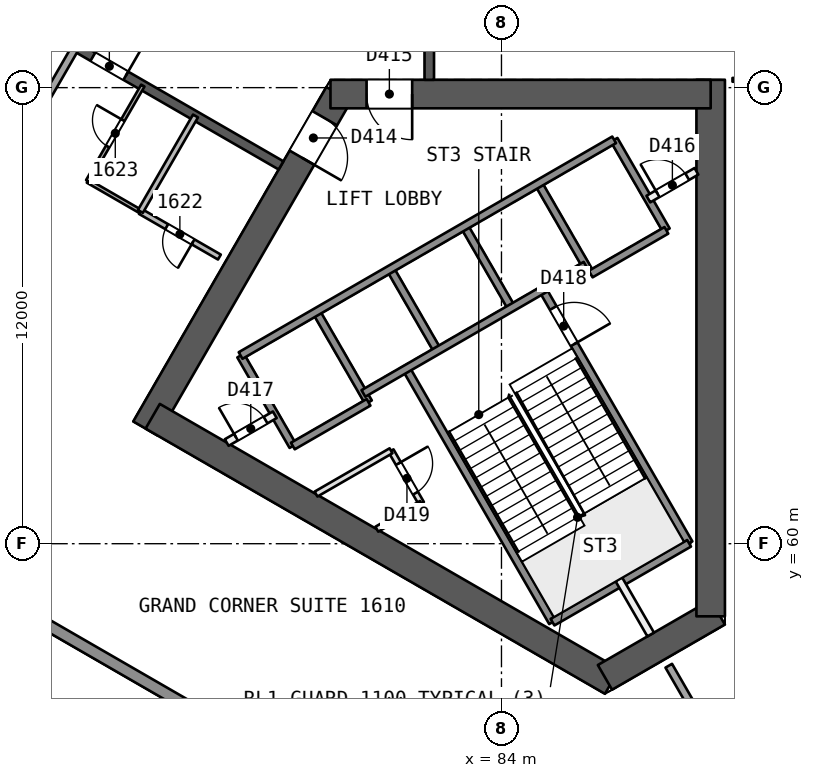
"""IFC4 building model, lengths in metres.
Left out: names, types, materials, properties, quantities, classifications, styles, units other than length and angle.
Written with IfcOpenShell. Run it as: python <this file> out.ifc"""

import sys

from ifc_helpers import new_model, si_unit, direction, frame, frame_2d, origin, place, context, subcontext, project, spatial, rectangle, extrude, element, fill, save


model = new_model("IFC4")
c1 = context("Model", 3, precision=1e-05, world=origin(), true_north=direction((0.0, 1.0)))
c2 = subcontext(c1, "Body", "Model", "MODEL_VIEW")
j1 = project(units=[si_unit("LENGTHUNIT", "METRE"), si_unit("PLANEANGLEUNIT", "RADIAN")], contexts=[c1])
p1 = place(None, origin())
s1 = spatial("IfcSite", under=j1, at=p1, CompositionType="ELEMENT")
p2 = place(p1, origin())
s2 = spatial("IfcBuilding", under=s1, at=p2, CompositionType="ELEMENT")
p3 = place(p2, frame((0.0, 0.0, 72.1)))
s3 = spatial("IfcBuildingStorey", under=s2, at=p3, CompositionType="ELEMENT", Elevation=72.1)
p4 = place(p3, frame((79.717, 71.831, 0.0), z_axis=(0.0, 0.0, 1.0), x_axis=(-0.499996230114, -0.866027580318, 0.0)))
e1 = element("IfcWall", 1, at=p4, inside=s3, PredefinedType="SHEAR", context=c2, shape_type="SweptSolid", body=[
    extrude(rectangle(XDim=10.164, YDim=0.75, at=frame_2d((5.082, 0.0))), origin(), (0.0, 0.0, 1.0), 3.7),
])
p5 = place(p4, frame((0.733, 0.0, 0.0)))
e2 = element("IfcOpeningElement", 2, at=p5, cuts=e1, PredefinedType="OPENING", context=c2, shape_type="SweptSolid", body=[
    extrude(rectangle(XDim=1.2, YDim=2.1, at=frame_2d((0.6, 1.05))), frame((0.0, 0.385, 0.0), z_axis=(0.0, -1.0, 0.0), x_axis=(1.0, 0.0, 0.0)), (0.0, 0.0, 1.0), 0.771),
])
p6 = place(p3, frame((74.822, 63.354, 0.0), z_axis=(0.0, 0.0, 1.0), x_axis=(0.8660248072, -0.500001033313, 0.0)))
e3 = element("IfcWall", 3, at=p6, inside=s3, PredefinedType="SHEAR", context=c2, shape_type="SweptSolid", body=[
    extrude(rectangle(XDim=13.958, YDim=0.75, at=frame_2d((6.979, 0.0))), origin(), (0.0, 0.0, 1.0), 3.7),
])
p7 = place(p3, frame((86.723, 56.483, 0.0), z_axis=(0.0, 0.0, 1.0), x_axis=(0.866017201164, 0.500014207086, 0.0)))
e4 = element("IfcWall", 4, at=p7, inside=s3, PredefinedType="SHEAR", context=c2, shape_type="SweptSolid", body=[
    extrude(rectangle(XDim=3.429, YDim=0.75, at=frame_2d((1.714, 0.0))), origin(), (0.0, 0.0, 1.0), 3.7),
])
p8 = place(p3, frame((89.505, 58.089, 0.0), z_axis=(0.0, 0.0, 1.0), x_axis=(0.0, 1.0, 0.0)))
e5 = element("IfcWall", 5, at=p8, inside=s3, PredefinedType="SHEAR", context=c2, shape_type="SweptSolid", body=[
    extrude(rectangle(XDim=14.117, YDim=0.75, at=frame_2d((7.059, 0.0))), origin(), (0.0, 0.0, 1.0), 3.7),
])
p9 = place(p3, frame((89.505, 71.831, 0.0), z_axis=(0.0, 0.0, 1.0), x_axis=(-1.0, 0.0, 0.0)))
e6 = element("IfcWall", 6, at=p9, inside=s3, PredefinedType="SHEAR", context=c2, shape_type="SweptSolid", body=[
    extrude(rectangle(XDim=10.005, YDim=0.75, at=frame_2d((5.002, 0.0))), origin(), (0.0, 0.0, 1.0), 3.7),
])
p10 = place(p9, frame((7.855, 0.0, 0.0)))
e7 = element("IfcOpeningElement", 7, at=p10, cuts=e6, PredefinedType="OPENING", context=c2, shape_type="SweptSolid", body=[
    extrude(rectangle(XDim=1.2, YDim=2.1, at=frame_2d((0.6, 1.05))), frame((0.0, 0.385, 0.0), z_axis=(0.0, -1.0, 0.0), x_axis=(1.0, 0.0, 0.0)), (0.0, 0.0, 1.0), 0.771),
])
p11 = place(p3, frame((82.1, 72.206, 0.0), z_axis=(0.0, 0.0, 1.0), x_axis=(0.0, 1.0, 0.0)))
e8 = element("IfcWall", 8, at=p11, inside=s3, PredefinedType="SHEAR", context=c2, shape_type="SweptSolid", body=[
    extrude(rectangle(XDim=15.588, YDim=0.25, at=frame_2d((7.794, 0.0))), origin(), (0.0, 0.0, 1.0), 3.2),
])
p12 = place(p11, frame((2.462, 0.0, 0.0)))
e9 = element("IfcOpeningElement", 9, at=p12, cuts=e8, PredefinedType="OPENING", context=c2, shape_type="SweptSolid", body=[
    extrude(rectangle(XDim=1.0, YDim=2.1, at=frame_2d((0.5, 1.05))), frame((0.0, 0.135, 0.0), z_axis=(0.0, -1.0, 0.0), x_axis=(1.0, 0.0, 0.0)), (0.0, 0.0, 1.0), 0.271),
])
p13 = place(p11, frame((6.799, 0.0, 0.0)))
e10 = element("IfcOpeningElement", 10, at=p13, cuts=e8, PredefinedType="OPENING", context=c2, shape_type="SweptSolid", body=[
    extrude(rectangle(XDim=0.9, YDim=2.1, at=frame_2d((0.45, 1.05))), frame((0.0, 0.135, 0.0), z_axis=(0.0, -1.0, 0.0), x_axis=(1.0, 0.0, 0.0)), (0.0, 0.0, 1.0), 0.271),
])
p14 = place(p11, frame((9.449, 0.0, 0.0)))
e11 = element("IfcOpeningElement", 11, at=p14, cuts=e8, PredefinedType="OPENING", context=c2, shape_type="SweptSolid", body=[
    extrude(rectangle(XDim=0.9, YDim=2.1, at=frame_2d((0.45, 1.05))), frame((0.0, 0.135, 0.0), z_axis=(0.0, -1.0, 0.0), x_axis=(1.0, 0.0, 0.0)), (0.0, 0.0, 1.0), 0.271),
])
p15 = place(p11, frame((12.906, 0.0, 0.0)))
e12 = element("IfcOpeningElement", 12, at=p15, cuts=e8, PredefinedType="OPENING", context=c2, shape_type="SweptSolid", body=[
    extrude(rectangle(XDim=1.0, YDim=2.1, at=frame_2d((0.5, 1.05))), frame((0.0, 0.135, 0.0), z_axis=(0.0, -1.0, 0.0), x_axis=(1.0, 0.0, 0.0)), (0.0, 0.0, 1.0), 0.271),
])
p16 = place(p3, frame((64.7, 77.748, 0.0), z_axis=(0.0, 0.0, 1.0), x_axis=(0.866026492143, -0.499998114903, 0.0)))
e13 = element("IfcWall", 13, at=p16, inside=s3, PredefinedType="SHEAR", context=c2, shape_type="SweptSolid", body=[
    extrude(rectangle(XDim=15.588, YDim=0.25, at=frame_2d((7.794, 0.0))), origin(), (0.0, 0.0, 1.0), 3.2),
])
p17 = place(p16, frame((2.306, 0.0, 0.0)))
e14 = element("IfcOpeningElement", 14, at=p17, cuts=e13, PredefinedType="OPENING", context=c2, shape_type="SweptSolid", body=[
    extrude(rectangle(XDim=1.0, YDim=2.1, at=frame_2d((0.5, 1.05))), frame((0.0, 0.135, 0.0), z_axis=(0.0, -1.0, 0.0), x_axis=(1.0, 0.0, 0.0)), (0.0, 0.0, 1.0), 0.271),
])
p18 = place(p16, frame((8.003, 0.0, 0.0)))
e15 = element("IfcOpeningElement", 15, at=p18, cuts=e13, PredefinedType="OPENING", context=c2, shape_type="SweptSolid", body=[
    extrude(rectangle(XDim=1.1, YDim=2.1, at=frame_2d((0.55, 1.05))), frame((0.0, 0.135, 0.0), z_axis=(0.0, -1.0, 0.0), x_axis=(1.0, 0.0, 0.0)), (0.0, 0.0, 1.0), 0.271),
])
p19 = place(p16, frame((9.871, 0.0, 0.0)))
e16 = element("IfcOpeningElement", 16, at=p19, cuts=e13, PredefinedType="OPENING", context=c2, shape_type="SweptSolid", body=[
    extrude(rectangle(XDim=1.0, YDim=2.1, at=frame_2d((0.5, 1.05))), frame((0.0, 0.135, 0.0), z_axis=(0.0, -1.0, 0.0), x_axis=(1.0, 0.0, 0.0)), (0.0, 0.0, 1.0), 0.271),
])
p20 = place(p3, frame((90.079, 72.206, 0.0), z_axis=(0.0, 0.0, 1.0), x_axis=(1.0, 0.0, 0.0)))
e17 = element("IfcWall", 17, at=p20, inside=s3, PredefinedType="PARTITIONING", context=c2, shape_type="SweptSolid", body=[
    extrude(rectangle(XDim=5.422, YDim=0.1, at=frame_2d((2.711, 0.0))), origin(), (0.0, 0.0, 1.0), 3.2),
])
p21 = place(p20, frame((2.261, 0.0, 0.0)))
e18 = element("IfcOpeningElement", 18, at=p21, cuts=e17, PredefinedType="OPENING", context=c2, shape_type="SweptSolid", body=[
    extrude(rectangle(XDim=0.9, YDim=2.1, at=frame_2d((0.45, 1.05))), frame((0.0, 0.061, 0.0), z_axis=(0.0, -1.0, 0.0), x_axis=(1.0, 0.0, 0.0)), (0.0, 0.0, 1.0), 0.121),
])
p22 = place(p3, frame((88.402, 56.789, 0.0), z_axis=(0.0, 0.0, 1.0), x_axis=(0.500005415952, -0.866022276861, 0.0)))
e19 = element("IfcWall", 19, at=p22, inside=s3, PredefinedType="PARTITIONING", context=c2, shape_type="SweptSolid", body=[
    extrude(rectangle(XDim=9.087, YDim=0.2, at=frame_2d((4.543, 0.0))), origin(), (0.0, 0.0, 1.0), 3.2),
])
p23 = place(p3, frame((66.099, 61.466, 0.0), z_axis=(0.0, 0.0, 1.0), x_axis=(0.500006835139, 0.866021457479, 0.0)))
e20 = element("IfcWall", 20, at=p23, inside=s3, PredefinedType="PARTITIONING", context=c2, shape_type="SweptSolid", body=[
    extrude(rectangle(XDim=13.401, YDim=0.2, at=frame_2d((6.701, 0.0))), origin(), (0.0, 0.0, 1.0), 3.2),
])
p24 = place(p3, frame((76.578, 67.542, 0.0), z_axis=(0.0, 0.0, 1.0), x_axis=(-0.866038271014, 0.499977712642, 0.0)))
e21 = element("IfcWall", 21, at=p24, inside=s3, PredefinedType="PARTITIONING", context=c2, shape_type="SweptSolid", body=[
    extrude(rectangle(XDim=2.401, YDim=0.15, at=frame_2d((1.2, 0.0))), origin(), (0.0, 0.0, 1.0), 3.2),
])
p25 = place(p24, frame((0.801, 0.0, 0.0)))
e22 = element("IfcOpeningElement", 22, at=p25, cuts=e21, PredefinedType="OPENING", context=c2, shape_type="SweptSolid", body=[
    extrude(rectangle(XDim=0.8, YDim=2.1, at=frame_2d((0.4, 1.05))), frame((0.0, 0.085, 0.0), z_axis=(0.0, -1.0, 0.0), x_axis=(1.0, 0.0, 0.0)), (0.0, 0.0, 1.0), 0.171),
])
p26 = place(p3, frame((74.498, 68.743, 0.0), z_axis=(0.0, 0.0, 1.0), x_axis=(-0.865989903783, 0.500061482766, 0.0)))
e23 = element("IfcWall", 23, at=p26, inside=s3, PredefinedType="PARTITIONING", context=c2, shape_type="SweptSolid", body=[
    extrude(rectangle(XDim=1.6, YDim=0.1, at=frame_2d((0.8, 0.0))), origin(), (0.0, 0.0, 1.0), 3.2),
])
p27 = place(p3, frame((73.113, 69.543, 0.0), z_axis=(0.0, 0.0, 1.0), x_axis=(0.499987231761, 0.866032775405, 0.0)))
e24 = element("IfcWall", 24, at=p27, inside=s3, PredefinedType="PARTITIONING", context=c2, shape_type="SweptSolid", body=[
    extrude(rectangle(XDim=2.9, YDim=0.1, at=frame_2d((1.45, 0.0))), origin(), (0.0, 0.0, 1.0), 3.2),
])
p28 = place(p27, frame((1.05, 0.0, 0.0)))
e25 = element("IfcOpeningElement", 25, at=p28, cuts=e24, PredefinedType="OPENING", context=c2, shape_type="SweptSolid", body=[
    extrude(rectangle(XDim=0.8, YDim=2.1, at=frame_2d((0.4, 1.05))), frame((0.0, 0.061, 0.0), z_axis=(0.0, -1.0, 0.0), x_axis=(1.0, 0.0, 0.0)), (0.0, 0.0, 1.0), 0.121),
])
p29 = place(p3, frame((75.948, 71.254, 0.0), z_axis=(0.0, 0.0, 1.0), x_axis=(-0.499987231761, -0.866032775405, 0.0)))
e26 = element("IfcWall", 26, at=p29, inside=s3, PredefinedType="PARTITIONING", context=c2, shape_type="SweptSolid", body=[
    extrude(rectangle(XDim=2.9, YDim=0.15, at=frame_2d((1.45, 0.0))), origin(), (0.0, 0.0, 1.0), 3.2),
])
p30 = place(p3, frame((90.388, 47.271, 0.0), z_axis=(0.0, 0.0, 1.0), x_axis=(-0.866024483997, 0.500001593116, 0.0)))
e27 = element("IfcWall", 27, at=p30, inside=s3, PredefinedType="SOLIDWALL", context=c2, shape_type="SweptSolid", body=[
    extrude(rectangle(XDim=59.381, YDim=0.3, at=frame_2d((29.69, 0.0))), origin(), (0.0, 0.0, 1.0), 3.2),
])
p31 = place(p30, frame((28.802, 0.0, 0.0)))
e28 = element("IfcOpeningElement", 28, at=p31, cuts=e27, PredefinedType="OPENING", context=c2, shape_type="SweptSolid", body=[
    extrude(rectangle(XDim=2.4, YDim=2.4, at=frame_2d((1.2, 1.2))), frame((0.0, 0.161, 0.0), z_axis=(0.0, -1.0, 0.0), x_axis=(1.0, 0.0, 0.0)), (0.0, 0.0, 1.0), 0.321),
])
p32 = place(p30, frame((33.479, 0.0, 0.0)))
e29 = element("IfcOpeningElement", 29, at=p32, cuts=e27, PredefinedType="OPENING", context=c2, shape_type="SweptSolid", body=[
    extrude(rectangle(XDim=2.4, YDim=2.4, at=frame_2d((1.2, 1.2))), frame((0.0, 0.161, 0.0), z_axis=(0.0, -1.0, 0.0), x_axis=(1.0, 0.0, 0.0)), (0.0, 0.0, 1.0), 0.321),
])
p33 = place(p30, frame((46.066, 0.0, 0.0)))
e30 = element("IfcOpeningElement", 30, at=p33, cuts=e27, PredefinedType="OPENING", context=c2, shape_type="SweptSolid", body=[
    extrude(rectangle(XDim=2.4, YDim=2.4, at=frame_2d((1.2, 1.2))), frame((0.0, 0.161, 0.0), z_axis=(0.0, -1.0, 0.0), x_axis=(1.0, 0.0, 0.0)), (0.0, 0.0, 1.0), 0.321),
])
p34 = place(p30, frame((12.823, 0.0, 0.0)))
e31 = element("IfcOpeningElement", 31, at=p34, cuts=e27, PredefinedType="OPENING", context=c2, shape_type="SweptSolid", body=[
    extrude(rectangle(XDim=2.4, YDim=2.4, at=frame_2d((1.2, 1.2))), frame((0.0, 0.161, 0.0), z_axis=(0.0, -1.0, 0.0), x_axis=(1.0, 0.0, 0.0)), (0.0, 0.0, 1.0), 0.321),
])
p35 = place(p3, frame((77.135, 64.952, 0.0), z_axis=(0.0, 0.0, 1.0), x_axis=(0.499996545922, -0.866027397988, 0.0)))
e32 = element("IfcWall", 32, at=p35, inside=s3, PredefinedType="SOLIDWALL", context=c2, shape_type="SweptSolid", body=[
    extrude(rectangle(XDim=2.75, YDim=0.2, at=frame_2d((1.375, 0.0))), origin(), (0.0, 0.0, 1.0), 3.2),
])
p36 = place(p3, frame((81.094, 62.445, 0.0), z_axis=(0.0, 0.0, 1.0), x_axis=(0.499880961361, -0.866094119867, 0.0)))
e33 = element("IfcWall", 33, at=p36, inside=s3, PredefinedType="PARTITIONING", context=c2, shape_type="SweptSolid", body=[
    extrude(rectangle(XDim=1.6, YDim=0.15, at=frame_2d((0.8, 0.0))), origin(), (0.0, 0.0, 1.0), 3.2),
])
p37 = place(p36, frame((0.387, 0.0, 0.0)))
e34 = element("IfcOpeningElement", 34, at=p37, cuts=e33, PredefinedType="OPENING", context=c2, shape_type="SweptSolid", body=[
    extrude(rectangle(XDim=0.9, YDim=2.1, at=frame_2d((0.45, 1.05))), frame((0.0, 0.085, 0.0), z_axis=(0.0, -1.0, 0.0), x_axis=(1.0, 0.0, 0.0)), (0.0, 0.0, 1.0), 0.171),
])
p38 = place(p3, frame((79.127, 66.102, 0.0), z_axis=(0.0, 0.0, 1.0), x_axis=(0.499996545922, -0.866027397988, 0.0)))
e35 = element("IfcWall", 35, at=p38, inside=s3, PredefinedType="SOLIDWALL", context=c2, shape_type="SweptSolid", body=[
    extrude(rectangle(XDim=2.75, YDim=0.2, at=frame_2d((1.375, 0.0))), origin(), (0.0, 0.0, 1.0), 3.2),
])
p39 = place(p3, frame((81.493, 64.604, 0.0), z_axis=(0.0, 0.0, 1.0), x_axis=(0.500006057782, -0.866021906294, 0.0)))
e36 = element("IfcWall", 36, at=p39, inside=s3, PredefinedType="SOLIDWALL", context=c2, shape_type="SweptSolid", body=[
    extrude(rectangle(XDim=7.7, YDim=0.2, at=frame_2d((3.85, 0.0))), origin(), (0.0, 0.0, 1.0), 3.2),
])
p40 = place(p3, frame((81.076, 67.227, 0.0), z_axis=(0.0, 0.0, 1.0), x_axis=(0.50000366821, -0.866023285932, 0.0)))
e37 = element("IfcWall", 37, at=p40, inside=s3, PredefinedType="SOLIDWALL", context=c2, shape_type="SweptSolid", body=[
    extrude(rectangle(XDim=2.48, YDim=0.2, at=frame_2d((1.24, 0.0))), origin(), (0.0, 0.0, 1.0), 3.2),
])
p41 = place(p3, frame((87.09, 59.06, 0.0), z_axis=(0.0, 0.0, 1.0), x_axis=(0.499937194881, -0.866061661301, 0.0)))
e38 = element("IfcWall", 38, at=p41, inside=s3, PredefinedType="PARTITIONING", context=c2, shape_type="SweptSolid", body=[
    extrude(rectangle(XDim=1.673, YDim=0.2, at=frame_2d((0.836, 0.0))), origin(), (0.0, 0.0, 1.0), 3.2),
])
p42 = place(p3, frame((83.024, 68.352, 0.0), z_axis=(0.0, 0.0, 1.0), x_axis=(0.50000366821, -0.866023285932, 0.0)))
e39 = element("IfcWall", 39, at=p42, inside=s3, PredefinedType="SOLIDWALL", context=c2, shape_type="SweptSolid", body=[
    extrude(rectangle(XDim=2.48, YDim=0.2, at=frame_2d((1.24, 0.0))), origin(), (0.0, 0.0, 1.0), 3.2),
])
p43 = place(p3, frame((85.087, 66.679, 0.0), z_axis=(0.0, 0.0, 1.0), x_axis=(0.500019787375, -0.866013979237, 0.0)))
e40 = element("IfcWall", 40, at=p43, inside=s3, PredefinedType="SOLIDWALL", context=c2, shape_type="SweptSolid", body=[
    extrude(rectangle(XDim=7.7, YDim=0.2, at=frame_2d((3.85, 0.0))), origin(), (0.0, 0.0, 1.0), 3.2),
])
p44 = place(p43, frame((0.55, 0.0, 0.0)))
e41 = element("IfcOpeningElement", 41, at=p44, cuts=e40, PredefinedType="OPENING", context=c2, shape_type="SweptSolid", body=[
    extrude(rectangle(XDim=1.1, YDim=2.1, at=frame_2d((0.55, 1.05))), frame((0.0, 0.11, 0.0), z_axis=(0.0, -1.0, 0.0), x_axis=(1.0, 0.0, 0.0)), (0.0, 0.0, 1.0), 0.221),
])
for number, where, z_axis, x_axis in (
    (42, (84.973, 69.477, 0.0), (0.0, 0.0, 1.0), (0.5, -0.866, 0.0)),
    (43, (86.965, 70.626, 0.0), (0.0, 0.0, 1.0), (0.5, -0.866, 0.0)),
):
    element("IfcWall", number, at=place(p3, frame(where, z_axis=z_axis, x_axis=x_axis)), inside=s3, PredefinedType="SOLIDWALL", context=c2, shape_type="SweptSolid", body=[
        extrude(rectangle(XDim=2.75, YDim=0.2, at=frame_2d((1.375, 0.0))), origin(), (0.0, 0.0, 1.0), 3.2),
    ])
p45 = place(p3, frame((77.135, 64.952, 0.0), z_axis=(0.0, 0.0, 1.0), x_axis=(0.866031916153, 0.499988720078, 0.0)))
e44 = element("IfcWall", 44, at=p45, inside=s3, PredefinedType="SOLIDWALL", context=c2, shape_type="SweptSolid", body=[
    extrude(rectangle(XDim=11.35, YDim=0.2, at=frame_2d((5.675, 0.0))), origin(), (0.0, 0.0, 1.0), 3.2),
])
p46 = place(p3, frame((76.77, 62.662, 0.0), z_axis=(0.0, 0.0, 1.0), x_axis=(0.866054810376, 0.49994906283, 0.0)))
e45 = element("IfcWall", 45, at=p46, inside=s3, PredefinedType="PARTITIONING", context=c2, shape_type="SweptSolid", body=[
    extrude(rectangle(XDim=1.461, YDim=0.2, at=frame_2d((0.73, 0.0))), origin(), (0.0, 0.0, 1.0), 3.2),
])
p47 = place(p46, frame((0.281, 0.0, 0.0)))
e46 = element("IfcOpeningElement", 46, at=p47, cuts=e45, PredefinedType="OPENING", context=c2, shape_type="SweptSolid", body=[
    extrude(rectangle(XDim=0.9, YDim=2.1, at=frame_2d((0.45, 1.05))), frame((0.0, 0.11, 0.0), z_axis=(0.0, -1.0, 0.0), x_axis=(1.0, 0.0, 0.0)), (0.0, 0.0, 1.0), 0.221),
])
p48 = place(p3, frame((87.865, 69.068, 0.0), z_axis=(0.0, 0.0, 1.0), x_axis=(0.865982457891, 0.500074377092, 0.0)))
e47 = element("IfcWall", 47, at=p48, inside=s3, PredefinedType="PARTITIONING", context=c2, shape_type="SweptSolid", body=[
    extrude(rectangle(XDim=1.461, YDim=0.2, at=frame_2d((0.73, 0.0))), origin(), (0.0, 0.0, 1.0), 3.2),
])
p49 = place(p48, frame((0.281, 0.0, 0.0)))
e48 = element("IfcOpeningElement", 48, at=p49, cuts=e47, PredefinedType="OPENING", context=c2, shape_type="SweptSolid", body=[
    extrude(rectangle(XDim=0.9, YDim=2.1, at=frame_2d((0.45, 1.05))), frame((0.0, 0.11, 0.0), z_axis=(0.0, -1.0, 0.0), x_axis=(1.0, 0.0, 0.0)), (0.0, 0.0, 1.0), 0.221),
])
p50 = place(p3, frame((80.367, 63.954, 0.0), z_axis=(0.0, 0.0, 1.0), x_axis=(0.866026575979, 0.499997969693, 0.0)))
e49 = element("IfcWall", 49, at=p50, inside=s3, PredefinedType="SOLIDWALL", context=c2, shape_type="SweptSolid", body=[
    extrude(rectangle(XDim=6.75, YDim=0.2, at=frame_2d((3.375, 0.0))), origin(), (0.0, 0.0, 1.0), 3.2),
])
p51 = place(p3, frame((78.51, 62.57, 0.0), z_axis=(0.0, 0.0, 1.0), x_axis=(0.866053019151, 0.499952165731, 0.0)))
e50 = element("IfcWall", 50, at=p51, inside=s3, PredefinedType="SOLIDWALL", context=c2, shape_type="SweptSolid", body=[
    extrude(rectangle(XDim=2.3, YDim=0.2, at=frame_2d((1.15, 0.0))), origin(), (0.0, 0.0, 1.0), 3.2),
])
p52 = place(p3, frame((86.348, 67.095, 0.0), z_axis=(0.0, 0.0, 1.0), x_axis=(0.86602648383, 0.499998129301, 0.0)))
e51 = element("IfcWall", 51, at=p52, inside=s3, PredefinedType="SOLIDWALL", context=c2, shape_type="SweptSolid", body=[
    extrude(rectangle(XDim=2.3, YDim=0.2, at=frame_2d((1.15, 0.0))), origin(), (0.0, 0.0, 1.0), 3.2),
])
p53 = place(p3, frame((79.12, 61.305, 0.0), z_axis=(0.0, 0.0, 1.0), x_axis=(0.866046471269, 0.499963508271, 0.0)))
e52 = element("IfcWall", 52, at=p53, inside=s3, PredefinedType="PARTITIONING", context=c2, shape_type="SweptSolid", body=[
    extrude(rectangle(XDim=2.28, YDim=0.15, at=frame_2d((1.14, 0.0))), origin(), (0.0, 0.0, 1.0), 3.2),
])
p54 = place(p3, frame((80.72, 60.382, 0.0), z_axis=(0.0, 0.0, 1.0), x_axis=(0.866017611601, 0.500013496215, 0.0)))
e53 = element("IfcWall", 53, at=p54, inside=s3, PredefinedType="PARTITIONING", context=c2, shape_type="SweptSolid", body=[
    extrude(rectangle(XDim=1.355, YDim=0.15, at=frame_2d((0.678, 0.0))), origin(), (0.0, 0.0, 1.0), 3.2),
])
p55 = place(p3, frame((85.343, 57.935, 0.0), z_axis=(0.0, 0.0, 1.0), x_axis=(0.866004344652, 0.500036473714, 0.0)))
e54 = element("IfcWall", 54, at=p55, inside=s3, PredefinedType="SOLIDWALL", context=c2, shape_type="SweptSolid", body=[
    extrude(rectangle(XDim=4.15, YDim=0.2, at=frame_2d((2.075, 0.0))), origin(), (0.0, 0.0, 1.0), 3.2),
])
p56 = place(p25, origin())
e55 = element("IfcDoor", 55, at=p56, inside=s3, OperationType="SINGLE_SWING_LEFT", PredefinedType="NOTDEFINED", context=c2, shape_type="SweptSolid", body=[
    extrude(rectangle(XDim=0.8, YDim=2.1, at=frame_2d((0.4, 1.05))), frame((0.0, 0.025, 0.0), z_axis=(0.0, -1.0, 0.0), x_axis=(1.0, 0.0, 0.0)), (0.0, 0.0, 1.0), 0.05),
])
fill(e22, e55)
p57 = place(p28, origin())
e56 = element("IfcDoor", 56, at=p57, inside=s3, OperationType="SINGLE_SWING_RIGHT", PredefinedType="NOTDEFINED", context=c2, shape_type="SweptSolid", body=[
    extrude(rectangle(XDim=0.8, YDim=2.1, at=frame_2d((0.4, 1.05))), frame((0.0, 0.025, 0.0), z_axis=(0.0, -1.0, 0.0), x_axis=(1.0, 0.0, 0.0)), (0.0, 0.0, 1.0), 0.05),
])
fill(e25, e56)
p58 = place(p19, origin())
e57 = element("IfcDoor", 57, at=p58, inside=s3, OperationType="SINGLE_SWING_RIGHT", PredefinedType="NOTDEFINED", context=c2, shape_type="SweptSolid", body=[
    extrude(rectangle(XDim=1.0, YDim=2.1, at=frame_2d((0.5, 1.05))), frame((0.0, 0.025, 0.0), z_axis=(0.0, -1.0, 0.0), x_axis=(1.0, 0.0, 0.0)), (0.0, 0.0, 1.0), 0.05),
])
fill(e16, e57)
p59 = place(p5, origin())
e58 = element("IfcDoor", 58, at=p59, inside=s3, OperationType="SINGLE_SWING_RIGHT", PredefinedType="NOTDEFINED", context=c2, shape_type="SweptSolid", body=[
    extrude(rectangle(XDim=1.2, YDim=2.1, at=frame_2d((0.6, 1.05))), frame((0.0, 0.025, 0.0), z_axis=(0.0, -1.0, 0.0), x_axis=(1.0, 0.0, 0.0)), (0.0, 0.0, 1.0), 0.05),
])
fill(e2, e58)
p60 = place(p10, origin())
e59 = element("IfcDoor", 59, at=p60, inside=s3, OperationType="SINGLE_SWING_LEFT", PredefinedType="NOTDEFINED", context=c2, shape_type="SweptSolid", body=[
    extrude(rectangle(XDim=1.2, YDim=2.1, at=frame_2d((0.6, 1.05))), frame((0.0, 0.025, 0.0), z_axis=(0.0, -1.0, 0.0), x_axis=(1.0, 0.0, 0.0)), (0.0, 0.0, 1.0), 0.05),
])
fill(e7, e59)
p61 = place(p49, origin())
e60 = element("IfcDoor", 60, at=p61, inside=s3, OperationType="SINGLE_SWING_LEFT", PredefinedType="NOTDEFINED", context=c2, shape_type="SweptSolid", body=[
    extrude(rectangle(XDim=0.9, YDim=2.1, at=frame_2d((0.45, 1.05))), frame((0.0, 0.025, 0.0), z_axis=(0.0, -1.0, 0.0), x_axis=(1.0, 0.0, 0.0)), (0.0, 0.0, 1.0), 0.05),
])
fill(e48, e60)
p62 = place(p47, origin())
e61 = element("IfcDoor", 61, at=p62, inside=s3, OperationType="SINGLE_SWING_LEFT", PredefinedType="NOTDEFINED", context=c2, shape_type="SweptSolid", body=[
    extrude(rectangle(XDim=0.9, YDim=2.1, at=frame_2d((0.45, 1.05))), frame((0.0, 0.025, 0.0), z_axis=(0.0, -1.0, 0.0), x_axis=(1.0, 0.0, 0.0)), (0.0, 0.0, 1.0), 0.05),
])
fill(e46, e61)
p63 = place(p44, origin())
e62 = element("IfcDoor", 62, at=p63, inside=s3, OperationType="SINGLE_SWING_RIGHT", PredefinedType="NOTDEFINED", context=c2, shape_type="SweptSolid", body=[
    extrude(rectangle(XDim=1.1, YDim=2.1, at=frame_2d((0.55, 1.05))), frame((0.0, 0.025, 0.0), z_axis=(0.0, -1.0, 0.0), x_axis=(1.0, 0.0, 0.0)), (0.0, 0.0, 1.0), 0.05),
])
fill(e41, e62)
p64 = place(p37, origin())
e63 = element("IfcDoor", 63, at=p64, inside=s3, OperationType="SINGLE_SWING_LEFT", PredefinedType="NOTDEFINED", context=c2, shape_type="SweptSolid", body=[
    extrude(rectangle(XDim=0.9, YDim=2.1, at=frame_2d((0.45, 1.05))), frame((0.0, 0.025, 0.0), z_axis=(0.0, -1.0, 0.0), x_axis=(1.0, 0.0, 0.0)), (0.0, 0.0, 1.0), 0.05),
])
fill(e34, e63)
save(model, sys.argv[1])
